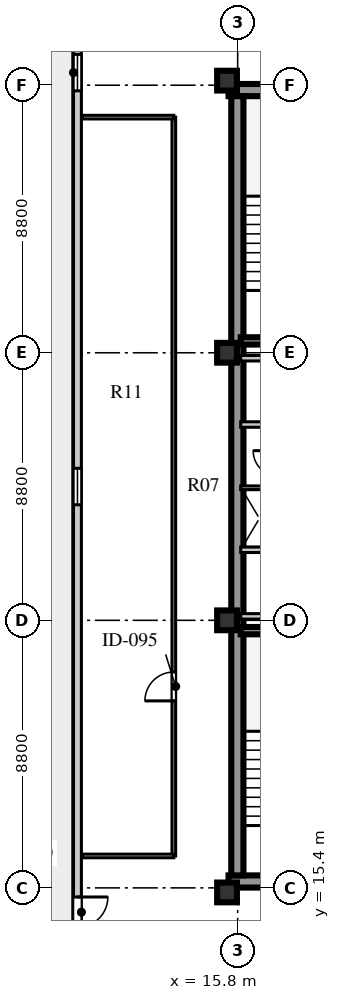
"""IFC4 building model, lengths in metres.
Left out: names, types, materials, properties, quantities, classifications, styles, units other than length and angle.
Written with IfcOpenShell. Run it as: python <this file> out.ifc"""

import sys

from ifc_helpers import new_model, si_unit, direction, frame, frame_2d, origin, origin_2d, place, context, subcontext, project, spatial, rectangle, extrude, element, fill, save


model = new_model("IFC4")
c1 = context("Model", 3, precision=1e-05, world=origin(), true_north=direction((0.0, 1.0)))
c2 = subcontext(c1, "Body", "Model", "MODEL_VIEW")
j1 = project(units=[si_unit("LENGTHUNIT", "METRE"), si_unit("PLANEANGLEUNIT", "RADIAN")], contexts=[c1])
p1 = place(None, origin())
s1 = spatial("IfcSite", under=j1, at=p1, CompositionType="ELEMENT")
p2 = place(p1, origin())
s2 = spatial("IfcBuilding", under=s1, at=p2, CompositionType="ELEMENT")
p3 = place(p2, frame((0.0, 0.0, 288.2)))
s3 = spatial("IfcBuildingStorey", under=s2, at=p3, CompositionType="ELEMENT", Elevation=288.2)
for number, where, z_axis, x_axis in (
    (1, (15.5, 15.61, 0.0), (0.0, 0.0, 1.0), (1.0, 0.0, 0.0)),
    (2, (15.5, 41.64, 0.0), (0.0, 0.0, 1.0), (1.0, 0.0, 0.0)),
):
    element("IfcWall", number, at=place(p3, frame(where, z_axis=z_axis, x_axis=x_axis)), inside=s3, PredefinedType="SHEAR", context=c2, shape_type="SweptSolid", body=[
        extrude(rectangle(XDim=9.48, YDim=0.4, at=frame_2d((4.74, 0.0))), origin(), (0.0, 0.0, 1.0), 3.66),
    ])
p4 = place(p3, frame((15.79, 15.81, 0.0), z_axis=(0.0, 0.0, 1.0), x_axis=(0.0, 1.0, 0.0)))
e3 = element("IfcWall", 3, at=p4, inside=s3, PredefinedType="SHEAR", context=c2, shape_type="SweptSolid", body=[
    extrude(rectangle(XDim=25.63, YDim=0.4, at=frame_2d((12.815, 0.0))), origin(), (0.0, 0.0, 1.0), 3.66),
])
for number, where, z_axis, x_axis in (
    (4, (15.45, 15.25, 0.0), (0.0, 0.0, 1.0), (1.0, 0.0, 0.0)),
    (5, (15.45, 24.2, 0.0), (0.0, 0.0, 1.0), (1.0, 0.0, 0.0)),
    (6, (15.45, 33.0, 0.0), (0.0, 0.0, 1.0), (1.0, 0.0, 0.0)),
    (7, (15.45, 41.95, 0.0), (0.0, 0.0, 1.0), (1.0, 0.0, 0.0)),
):
    element("IfcColumn", number, at=place(p3, frame(where, z_axis=z_axis, x_axis=x_axis)), inside=s3, PredefinedType="COLUMN", context=c2, shape_type="SweptSolid", body=[
        extrude(rectangle(XDim=0.65, YDim=0.65, at=origin_2d()), origin(), (0.0, 0.0, 1.0), 3.66),
    ])
p5 = place(p3, frame((10.53, 43.79, 0.0), z_axis=(0.0, 0.0, 1.0), x_axis=(0.0, -1.0, 0.0)))
e8 = element("IfcWall", 8, at=p5, inside=s3, PredefinedType="SOLIDWALL", context=c2, shape_type="SweptSolid", body=[
    extrude(rectangle(XDim=30.38, YDim=0.26, at=frame_2d((15.19, 0.0))), origin(), (0.0, 0.0, 1.0), 3.66),
])
p6 = place(p5, frame((28.69, 0.0, 0.0)))
e9 = element("IfcOpeningElement", 9, at=p6, cuts=e8, PredefinedType="OPENING", context=c2, shape_type="SweptSolid", body=[
    extrude(rectangle(XDim=1.0, YDim=2.05, at=frame_2d((0.5, 1.025))), frame((0.0, 0.14, 0.0), z_axis=(0.0, -1.0, 0.0), x_axis=(1.0, 0.0, 0.0)), (0.0, 0.0, 1.0), 0.28),
])
p7 = place(p5, frame((14.59, 0.0, 0.8)))
e10 = element("IfcOpeningElement", 10, at=p7, cuts=e8, PredefinedType="OPENING", context=c2, shape_type="SweptSolid", body=[
    extrude(rectangle(XDim=1.2, YDim=1.75, at=frame_2d((0.6, 0.875))), frame((0.0, 0.14, 0.0), z_axis=(0.0, -1.0, 0.0), x_axis=(1.0, 0.0, 0.0)), (0.0, 0.0, 1.0), 0.28),
])
p8 = place(p5, frame((0.975, 0.0, 0.8)))
e11 = element("IfcOpeningElement", 11, at=p8, cuts=e8, PredefinedType="OPENING", context=c2, shape_type="SweptSolid", body=[
    extrude(rectangle(XDim=1.2, YDim=1.75, at=frame_2d((0.6, 0.875))), frame((0.0, 0.14, 0.0), z_axis=(0.0, -1.0, 0.0), x_axis=(1.0, 0.0, 0.0)), (0.0, 0.0, 1.0), 0.28),
])
p9 = place(p3, frame((15.9, 23.86, 0.0), z_axis=(0.0, 0.0, 1.0), x_axis=(1.0, 0.0, 0.0)))
e12 = element("IfcWall", 12, at=p9, inside=s3, PredefinedType="SHEAR", context=c2, shape_type="SweptSolid", body=[
    extrude(rectangle(XDim=3.52, YDim=0.24, at=frame_2d((1.76, 0.0))), origin(), (0.0, 0.0, 1.0), 3.9),
])
p10 = place(p3, frame((15.9, 26.52, 0.0), z_axis=(0.0, 0.0, 1.0), x_axis=(1.0, 0.0, 0.0)))
e13 = element("IfcWall", 13, at=p10, inside=s3, PredefinedType="SOLIDWALL", context=c2, shape_type="SweptSolid", body=[
    extrude(rectangle(XDim=8.68, YDim=0.18, at=frame_2d((4.34, 0.0))), origin(), (0.0, 0.0, 1.0), 3.66),
])
p11 = place(p10, frame((2.05, 0.0, 0.0)))
e14 = element("IfcOpeningElement", 14, at=p11, cuts=e13, PredefinedType="OPENING", context=c2, shape_type="SweptSolid", body=[
    extrude(rectangle(XDim=0.85, YDim=2.06, at=frame_2d((0.425, 1.03))), frame((0.0, 0.1, 0.0), z_axis=(0.0, -1.0, 0.0), x_axis=(1.0, 0.0, 0.0)), (0.0, 0.0, 1.0), 0.2),
])
p12 = place(p10, frame((5.2, 0.0, 0.0)))
e15 = element("IfcOpeningElement", 15, at=p12, cuts=e13, PredefinedType="OPENING", context=c2, shape_type="SweptSolid", body=[
    extrude(rectangle(XDim=0.95, YDim=2.1, at=frame_2d((0.475, 1.05))), frame((0.0, 0.1, 0.0), z_axis=(0.0, -1.0, 0.0), x_axis=(1.0, 0.0, 0.0)), (0.0, 0.0, 1.0), 0.2),
])
p13 = place(p3, frame((15.9, 24.33, 0.0), z_axis=(0.0, 0.0, 1.0), x_axis=(1.0, 0.0, 0.0)))
e16 = element("IfcWall", 16, at=p13, inside=s3, PredefinedType="SOLIDWALL", context=c2, shape_type="SweptSolid", body=[
    extrude(rectangle(XDim=8.68, YDim=0.18, at=frame_2d((4.34, 0.0))), origin(), (0.0, 0.0, 1.0), 3.06),
])
p14 = place(p3, frame((15.9, 28.56, 0.0), z_axis=(0.0, 0.0, 1.0), x_axis=(1.0, 0.0, 0.0)))
e17 = element("IfcWall", 17, at=p14, inside=s3, PredefinedType="PARTITIONING", context=c2, shape_type="SweptSolid", body=[
    extrude(rectangle(XDim=1.2, YDim=0.12, at=frame_2d((0.6, 0.0))), origin(), (0.0, 0.0, 1.0), 3.66),
])
p15 = place(p3, frame((15.9, 30.64, 0.0), z_axis=(0.0, 0.0, 1.0), x_axis=(1.0, 0.0, 0.0)))
e18 = element("IfcWall", 18, at=p15, inside=s3, PredefinedType="SOLIDWALL", context=c2, shape_type="SweptSolid", body=[
    extrude(rectangle(XDim=8.68, YDim=0.18, at=frame_2d((4.34, 0.0))), origin(), (0.0, 0.0, 1.0), 3.66),
])
p16 = place(p15, frame((3.7, 0.0, 0.0)))
e19 = element("IfcOpeningElement", 19, at=p16, cuts=e18, PredefinedType="OPENING", context=c2, shape_type="SweptSolid", body=[
    extrude(rectangle(XDim=0.95, YDim=2.1, at=frame_2d((0.475, 1.05))), frame((0.0, 0.1, 0.0), z_axis=(0.0, -1.0, 0.0), x_axis=(1.0, 0.0, 0.0)), (0.0, 0.0, 1.0), 0.2),
])
p17 = place(p3, frame((15.9, 32.82, 0.0), z_axis=(0.0, 0.0, 1.0), x_axis=(1.0, 0.0, 0.0)))
e20 = element("IfcWall", 20, at=p17, inside=s3, PredefinedType="SOLIDWALL", context=c2, shape_type="SweptSolid", body=[
    extrude(rectangle(XDim=8.68, YDim=0.18, at=frame_2d((4.34, 0.0))), origin(), (0.0, 0.0, 1.0), 3.06),
])
p18 = place(p3, frame((15.9, 33.39, 0.0), z_axis=(0.0, 0.0, 1.0), x_axis=(1.0, 0.0, 0.0)))
e21 = element("IfcWall", 21, at=p18, inside=s3, PredefinedType="SHEAR", context=c2, shape_type="SweptSolid", body=[
    extrude(rectangle(XDim=3.52, YDim=0.24, at=frame_2d((1.76, 0.0))), origin(), (0.0, 0.0, 1.0), 3.9),
])
p19 = place(p3, frame((13.7, 16.45, 0.0), z_axis=(0.0, 0.0, 1.0), x_axis=(0.0, 1.0, 0.0)))
e22 = element("IfcWall", 22, at=p19, inside=s3, PredefinedType="PARTITIONING", context=c2, shape_type="SweptSolid", body=[
    extrude(rectangle(XDim=24.3, YDim=0.12, at=frame_2d((12.15, 0.0))), origin(), (0.0, 0.0, 1.0), 3.66),
])
p20 = place(p19, frame((5.1, 0.0, 0.0)))
e23 = element("IfcOpeningElement", 23, at=p20, cuts=e22, PredefinedType="OPENING", context=c2, shape_type="SweptSolid", body=[
    extrude(rectangle(XDim=0.95, YDim=2.08, at=frame_2d((0.475, 1.04))), frame((0.0, 0.07, 0.0), z_axis=(0.0, -1.0, 0.0), x_axis=(1.0, 0.0, 0.0)), (0.0, 0.0, 1.0), 0.14),
])
for number, where, z_axis, x_axis in (
    (24, (10.68, 16.45, 0.0), (0.0, 0.0, 1.0), (1.0, 0.0, 0.0)),
    (25, (10.68, 40.75, 0.0), (0.0, 0.0, 1.0), (1.0, 0.0, 0.0)),
):
    element("IfcWall", number, at=place(p3, frame(where, z_axis=z_axis, x_axis=x_axis)), inside=s3, PredefinedType="PARTITIONING", context=c2, shape_type="SweptSolid", body=[
        extrude(rectangle(XDim=3.02, YDim=0.12, at=frame_2d((1.51, 0.0))), origin(), (0.0, 0.0, 1.0), 3.66),
    ])
p21 = place(p6, frame((1.0, 0.0, 0.0), z_axis=(0.0, 0.0, 1.0), x_axis=(-1.0, 0.0, 0.0)))
e26 = element("IfcDoor", 26, at=p21, inside=s3, OperationType="SINGLE_SWING_RIGHT", PredefinedType="DOOR", context=c2, shape_type="SweptSolid", body=[
    extrude(rectangle(XDim=1.0, YDim=2.05, at=frame_2d((0.5, 1.025))), frame((0.0, 0.025, 0.0), z_axis=(0.0, -1.0, 0.0), x_axis=(1.0, 0.0, 0.0)), (0.0, 0.0, 1.0), 0.05),
])
fill(e9, e26)
p22 = place(p7, origin())
e27 = element("IfcWindow", 27, at=p22, inside=s3, PartitioningType="SINGLE_PANEL", PredefinedType="WINDOW", context=c2, shape_type="SweptSolid", body=[
    extrude(rectangle(XDim=1.2, YDim=1.75, at=frame_2d((0.6, 0.875))), frame((0.0, 0.03, 0.0), z_axis=(0.0, -1.0, 0.0), x_axis=(1.0, 0.0, 0.0)), (0.0, 0.0, 1.0), 0.06),
])
fill(e10, e27)
p23 = place(p8, origin())
e28 = element("IfcWindow", 28, at=p23, inside=s3, PartitioningType="SINGLE_PANEL", PredefinedType="WINDOW", context=c2, shape_type="SweptSolid", body=[
    extrude(rectangle(XDim=1.2, YDim=1.75, at=frame_2d((0.6, 0.875))), frame((0.0, 0.03, 0.0), z_axis=(0.0, -1.0, 0.0), x_axis=(1.0, 0.0, 0.0)), (0.0, 0.0, 1.0), 0.06),
])
fill(e11, e28)
p24 = place(p20, origin())
e29 = element("IfcDoor", 29, at=p24, inside=s3, OperationType="SINGLE_SWING_LEFT", PredefinedType="DOOR", context=c2, shape_type="SweptSolid", body=[
    extrude(rectangle(XDim=0.95, YDim=2.08, at=frame_2d((0.475, 1.04))), frame((0.0, 0.025, 0.0), z_axis=(0.0, -1.0, 0.0), x_axis=(1.0, 0.0, 0.0)), (0.0, 0.0, 1.0), 0.05),
])
fill(e23, e29)
save(model, sys.argv[1])
